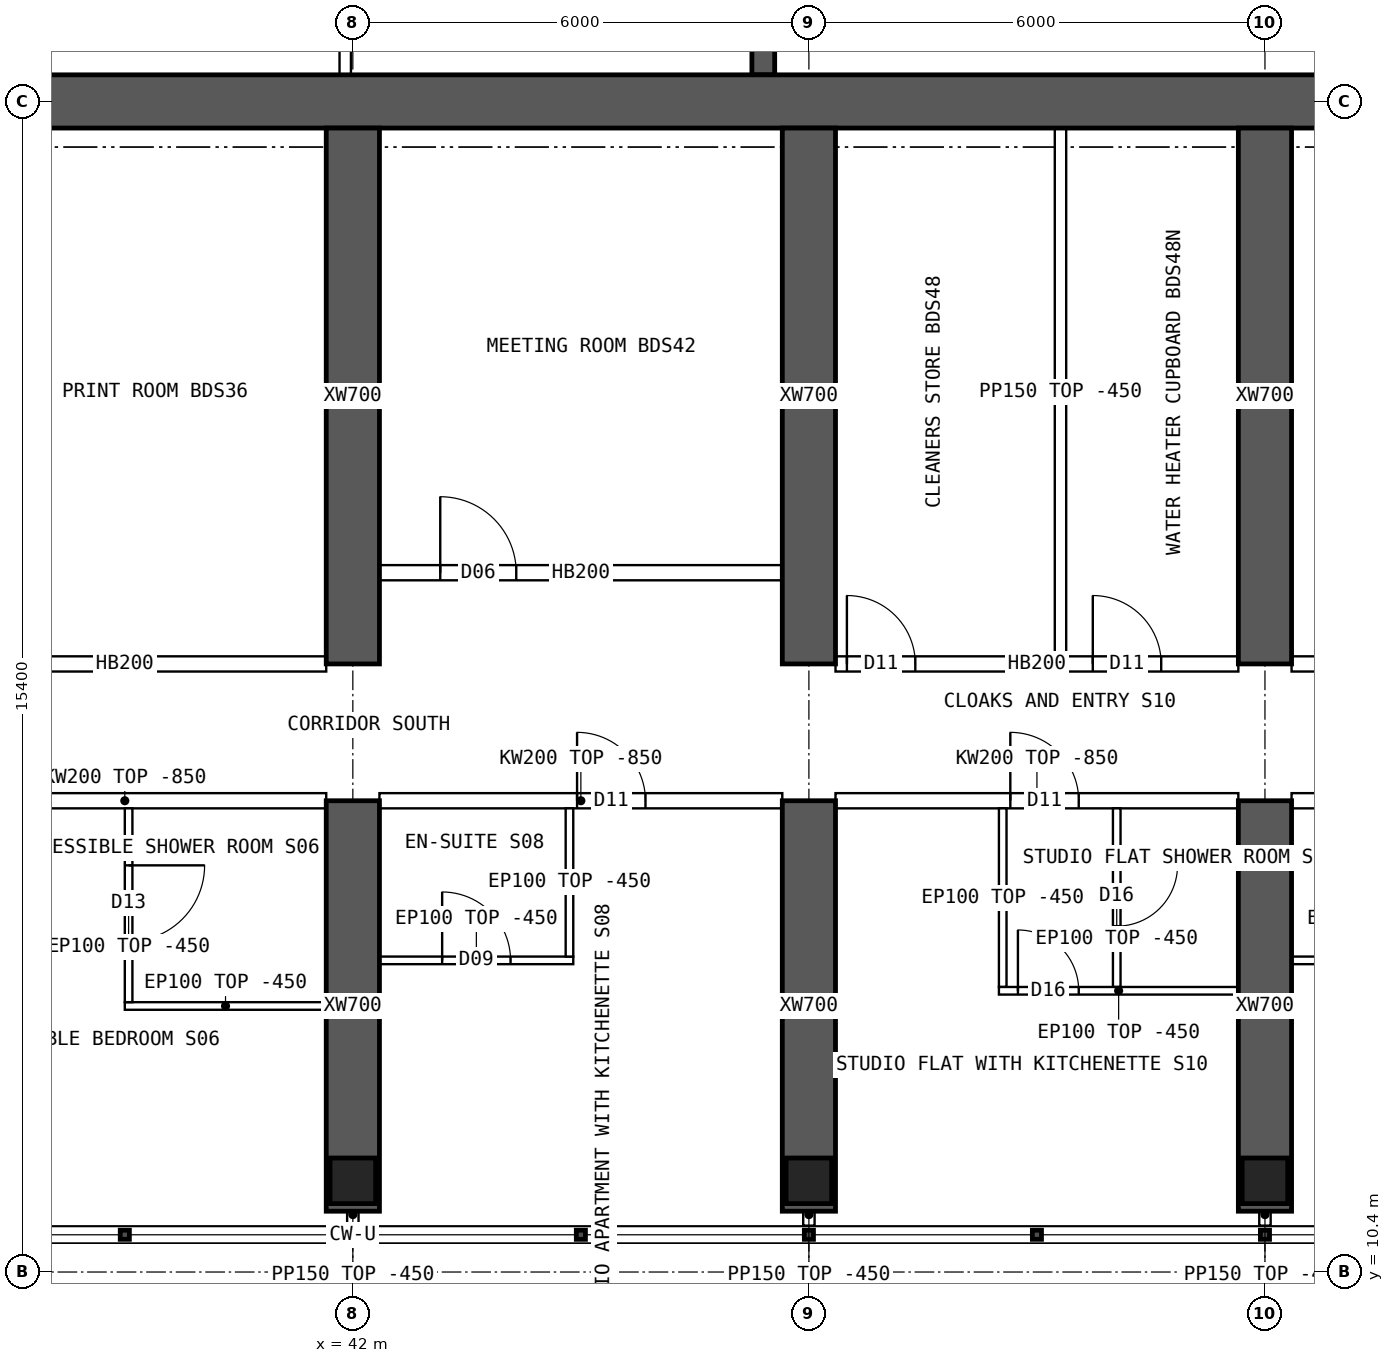
"""IFC4 building model, lengths in metres.
Left out: names, types, materials, properties, quantities, classifications, styles, units other than length and angle.
Written with IfcOpenShell. Run it as: python <this file> out.ifc"""

import sys

from ifc_helpers import new_model, si_unit, direction, frame, frame_2d, origin, origin_2d, place, context, subcontext, project, spatial, polyline, rectangle, hollow_rectangle, outline, extrude, element, fill, save


model = new_model("IFC4")
c1 = context("Model", 3, precision=1e-05, world=origin(), true_north=direction((0.0, 1.0)))
c2 = subcontext(c1, "Body", "Model", "MODEL_VIEW")
j1 = project(units=[si_unit("LENGTHUNIT", "METRE"), si_unit("PLANEANGLEUNIT", "RADIAN")], contexts=[c1])
p1 = place(None, origin())
s1 = spatial("IfcSite", under=j1, at=p1, CompositionType="ELEMENT")
p2 = place(p1, origin())
s2 = spatial("IfcBuilding", under=s1, at=p2, CompositionType="ELEMENT")
p3 = place(p2, frame((0.0, 0.0, 227.8)))
s3 = spatial("IfcBuildingStorey", under=s2, at=p3, CompositionType="ELEMENT", Elevation=227.8)
for number, where, z_axis, x_axis in (
    (1, (42.0, 11.6, 0.0), (0.0, 0.0, 1.0), (1.0, 0.0, 0.0)),
    (2, (48.0, 11.6, 0.0), (0.0, 0.0, 1.0), (1.0, 0.0, 0.0)),
    (3, (54.0, 11.6, 0.0), (0.0, 0.0, 1.0), (1.0, 0.0, 0.0)),
):
    element("IfcColumn", number, at=place(p3, frame(where, z_axis=z_axis, x_axis=x_axis)), inside=s3, PredefinedType="COLUMN", context=c2, shape_type="SweptSolid", body=[
        extrude(hollow_rectangle(XDim=0.6, YDim=0.6, WallThickness=0.06, at=origin_2d()), origin(), (0.0, 0.0, 1.0), 3.75),
    ])
p4 = place(p3, frame((18.0, 25.8, 0.0), z_axis=(0.0, 0.0, 1.0), x_axis=(1.0, 0.0, 0.0)))
e4 = element("IfcWall", 4, at=p4, inside=s3, PredefinedType="SHEAR", context=c2, shape_type="SweptSolid", body=[
    extrude(rectangle(XDim=48.0, YDim=0.7, at=frame_2d((24.0, 0.0))), origin(), (0.0, 0.0, 1.0), 3.75),
])
p5 = place(p3, frame((47.4, 26.15, 0.0), z_axis=(0.0, 0.0, 1.0), x_axis=(0.0, 1.0, 0.0)))
e5 = element("IfcWall", 5, at=p5, inside=s3, PredefinedType="SHEAR", context=c2, shape_type="SweptSolid", body=[
    extrude(rectangle(XDim=4.1, YDim=0.3, at=frame_2d((2.05, 0.0))), origin(), (0.0, 0.0, 1.0), 3.75),
])
p6 = place(p3, frame((42.0, 11.2, 0.0), z_axis=(0.0, 0.0, 1.0), x_axis=(0.0, 1.0, 0.0)))
e6 = element("IfcWall", 6, at=p6, inside=s3, PredefinedType="SHEAR", context=c2, shape_type="SweptSolid", body=[
    extrude(rectangle(XDim=5.4, YDim=0.7, at=frame_2d((2.7, 0.0))), origin(), (0.0, 0.0, 1.0), 3.75),
])
p7 = place(p3, frame((42.0, 18.4, 0.0), z_axis=(0.0, 0.0, 1.0), x_axis=(0.0, 1.0, 0.0)))
e7 = element("IfcWall", 7, at=p7, inside=s3, PredefinedType="SHEAR", context=c2, shape_type="SweptSolid", body=[
    extrude(rectangle(XDim=7.05, YDim=0.7, at=frame_2d((3.525, 0.0))), origin(), (0.0, 0.0, 1.0), 3.75),
])
p8 = place(p3, frame((48.0, 11.2, 0.0), z_axis=(0.0, 0.0, 1.0), x_axis=(0.0, 1.0, 0.0)))
e8 = element("IfcWall", 8, at=p8, inside=s3, PredefinedType="SHEAR", context=c2, shape_type="SweptSolid", body=[
    extrude(rectangle(XDim=5.4, YDim=0.7, at=frame_2d((2.7, 0.0))), origin(), (0.0, 0.0, 1.0), 3.75),
])
p9 = place(p3, frame((48.0, 18.4, 0.0), z_axis=(0.0, 0.0, 1.0), x_axis=(0.0, 1.0, 0.0)))
e9 = element("IfcWall", 9, at=p9, inside=s3, PredefinedType="SHEAR", context=c2, shape_type="SweptSolid", body=[
    extrude(rectangle(XDim=7.05, YDim=0.7, at=frame_2d((3.525, 0.0))), origin(), (0.0, 0.0, 1.0), 3.75),
])
p10 = place(p3, frame((54.0, 11.2, 0.0), z_axis=(0.0, 0.0, 1.0), x_axis=(0.0, 1.0, 0.0)))
e10 = element("IfcWall", 10, at=p10, inside=s3, PredefinedType="SHEAR", context=c2, shape_type="SweptSolid", body=[
    extrude(rectangle(XDim=5.4, YDim=0.7, at=frame_2d((2.7, 0.0))), origin(), (0.0, 0.0, 1.0), 3.75),
])
p11 = place(p3, frame((54.0, 18.4, 0.0), z_axis=(0.0, 0.0, 1.0), x_axis=(0.0, 1.0, 0.0)))
e11 = element("IfcWall", 11, at=p11, inside=s3, PredefinedType="SHEAR", context=c2, shape_type="SweptSolid", body=[
    extrude(rectangle(XDim=7.05, YDim=0.7, at=frame_2d((3.525, 0.0))), origin(), (0.0, 0.0, 1.0), 3.75),
])
p12 = place(p3, frame((41.9, 26.15, 0.0), z_axis=(0.0, 0.0, 1.0), x_axis=(0.0, 1.0, 0.0)))
e12 = element("IfcWall", 12, at=p12, inside=s3, PredefinedType="SOLIDWALL", context=c2, shape_type="SweptSolid", body=[
    extrude(rectangle(XDim=4.1, YDim=0.15, at=frame_2d((2.05, 0.0))), origin(), (0.0, 0.0, 1.0), 3.3),
])
p13 = place(p3, frame((36.35, 16.6, 0.0), z_axis=(0.0, 0.0, 1.0), x_axis=(1.0, 0.0, 0.0)))
e13 = element("IfcWall", 13, at=p13, inside=s3, PredefinedType="SOLIDWALL", context=c2, shape_type="SweptSolid", body=[
    extrude(outline(polyline([(0.0, 0.0), (5.3, 0.0), (5.3, 2.9), (0.0, 2.9), (0.0, 0.0)])), frame((0.0, 0.1, 0.0), z_axis=(0.0, -1.0, 0.0), x_axis=(1.0, 0.0, 0.0)), (0.0, 0.0, 1.0), 0.2),
])
p14 = place(p13, frame((0.3, 0.0, 0.0)))
e14 = element("IfcOpeningElement", 14, at=p14, cuts=e13, PredefinedType="OPENING", context=c2, shape_type="SweptSolid", body=[
    extrude(rectangle(XDim=1.0, YDim=2.1, at=frame_2d((0.5, 1.05))), frame((0.0, 0.11, 0.0), z_axis=(0.0, -1.0, 0.0), x_axis=(1.0, 0.0, 0.0)), (0.0, 0.0, 1.0), 0.22),
])
p15 = place(p3, frame((36.35, 18.4, 0.0), z_axis=(0.0, 0.0, 1.0), x_axis=(1.0, 0.0, 0.0)))
e15 = element("IfcWall", 15, at=p15, inside=s3, PredefinedType="SOLIDWALL", context=c2, shape_type="SweptSolid", body=[
    extrude(rectangle(XDim=5.3, YDim=0.2, at=frame_2d((2.65, 0.0))), origin(), (0.0, 0.0, 1.0), 3.3),
])
p16 = place(p15, frame((0.525, 0.0, 0.0)))
e16 = element("IfcOpeningElement", 16, at=p16, cuts=e15, PredefinedType="OPENING", context=c2, shape_type="SweptSolid", body=[
    extrude(rectangle(XDim=1.0, YDim=2.1, at=frame_2d((0.5, 1.05))), frame((0.0, 0.11, 0.0), z_axis=(0.0, -1.0, 0.0), x_axis=(1.0, 0.0, 0.0)), (0.0, 0.0, 1.0), 0.22),
])
p17 = place(p3, frame((42.35, 16.6, 0.0), z_axis=(0.0, 0.0, 1.0), x_axis=(1.0, 0.0, 0.0)))
e17 = element("IfcWall", 17, at=p17, inside=s3, PredefinedType="SOLIDWALL", context=c2, shape_type="SweptSolid", body=[
    extrude(outline(polyline([(0.0, 0.0), (5.3, 0.0), (5.3, 2.9), (0.0, 2.9), (0.0, 0.0)])), frame((0.0, 0.1, 0.0), z_axis=(0.0, -1.0, 0.0), x_axis=(1.0, 0.0, 0.0)), (0.0, 0.0, 1.0), 0.2),
])
p18 = place(p17, frame((2.6, 0.0, 0.0)))
e18 = element("IfcOpeningElement", 18, at=p18, cuts=e17, PredefinedType="OPENING", context=c2, shape_type="SweptSolid", body=[
    extrude(rectangle(XDim=0.9, YDim=2.1, at=frame_2d((0.45, 1.05))), frame((0.0, 0.11, 0.0), z_axis=(0.0, -1.0, 0.0), x_axis=(1.0, 0.0, 0.0)), (0.0, 0.0, 1.0), 0.22),
])
p19 = place(p3, frame((48.35, 16.6, 0.0), z_axis=(0.0, 0.0, 1.0), x_axis=(1.0, 0.0, 0.0)))
e19 = element("IfcWall", 19, at=p19, inside=s3, PredefinedType="SOLIDWALL", context=c2, shape_type="SweptSolid", body=[
    extrude(outline(polyline([(0.0, 0.0), (5.3, 0.0), (5.3, 2.9), (0.0, 2.9), (0.0, 0.0)])), frame((0.0, 0.1, 0.0), z_axis=(0.0, -1.0, 0.0), x_axis=(1.0, 0.0, 0.0)), (0.0, 0.0, 1.0), 0.2),
])
p20 = place(p19, frame((2.3, 0.0, 0.0)))
e20 = element("IfcOpeningElement", 20, at=p20, cuts=e19, PredefinedType="OPENING", context=c2, shape_type="SweptSolid", body=[
    extrude(rectangle(XDim=0.9, YDim=2.1, at=frame_2d((0.45, 1.05))), frame((0.0, 0.11, 0.0), z_axis=(0.0, -1.0, 0.0), x_axis=(1.0, 0.0, 0.0)), (0.0, 0.0, 1.0), 0.22),
])
p21 = place(p3, frame((48.35, 18.4, 0.0), z_axis=(0.0, 0.0, 1.0), x_axis=(1.0, 0.0, 0.0)))
e21 = element("IfcWall", 21, at=p21, inside=s3, PredefinedType="SOLIDWALL", context=c2, shape_type="SweptSolid", body=[
    extrude(rectangle(XDim=5.3, YDim=0.2, at=frame_2d((2.65, 0.0))), origin(), (0.0, 0.0, 1.0), 3.3),
])
p22 = place(p21, frame((0.15, 0.0, 0.0)))
e22 = element("IfcOpeningElement", 22, at=p22, cuts=e21, PredefinedType="OPENING", context=c2, shape_type="SweptSolid", body=[
    extrude(rectangle(XDim=0.9, YDim=2.1, at=frame_2d((0.45, 1.05))), frame((0.0, 0.11, 0.0), z_axis=(0.0, -1.0, 0.0), x_axis=(1.0, 0.0, 0.0)), (0.0, 0.0, 1.0), 0.22),
])
p23 = place(p21, frame((3.385, 0.0, 0.0)))
e23 = element("IfcOpeningElement", 23, at=p23, cuts=e21, PredefinedType="OPENING", context=c2, shape_type="SweptSolid", body=[
    extrude(rectangle(XDim=0.9, YDim=2.1, at=frame_2d((0.45, 1.05))), frame((0.0, 0.11, 0.0), z_axis=(0.0, -1.0, 0.0), x_axis=(1.0, 0.0, 0.0)), (0.0, 0.0, 1.0), 0.22),
])
p24 = place(p3, frame((54.35, 16.6, 0.0), z_axis=(0.0, 0.0, 1.0), x_axis=(1.0, 0.0, 0.0)))
e24 = element("IfcWall", 24, at=p24, inside=s3, PredefinedType="SOLIDWALL", context=c2, shape_type="SweptSolid", body=[
    extrude(outline(polyline([(0.0, 0.0), (5.3, 0.0), (5.3, 2.9), (0.0, 2.9), (0.0, 0.0)])), frame((0.0, 0.1, 0.0), z_axis=(0.0, -1.0, 0.0), x_axis=(1.0, 0.0, 0.0)), (0.0, 0.0, 1.0), 0.2),
])
p25 = place(p24, frame((2.6, 0.0, 0.0)))
e25 = element("IfcOpeningElement", 25, at=p25, cuts=e24, PredefinedType="OPENING", context=c2, shape_type="SweptSolid", body=[
    extrude(rectangle(XDim=0.9, YDim=2.1, at=frame_2d((0.45, 1.05))), frame((0.0, 0.11, 0.0), z_axis=(0.0, -1.0, 0.0), x_axis=(1.0, 0.0, 0.0)), (0.0, 0.0, 1.0), 0.22),
])
p26 = place(p3, frame((54.35, 18.4, 0.0), z_axis=(0.0, 0.0, 1.0), x_axis=(1.0, 0.0, 0.0)))
e26 = element("IfcWall", 26, at=p26, inside=s3, PredefinedType="SOLIDWALL", context=c2, shape_type="SweptSolid", body=[
    extrude(rectangle(XDim=5.3, YDim=0.2, at=frame_2d((2.65, 0.0))), origin(), (0.0, 0.0, 1.0), 3.3),
])
p27 = place(p26, frame((0.8, 0.0, 0.0)))
e27 = element("IfcOpeningElement", 27, at=p27, cuts=e26, PredefinedType="OPENING", context=c2, shape_type="SweptSolid", body=[
    extrude(rectangle(XDim=1.0, YDim=2.1, at=frame_2d((0.5, 1.05))), frame((0.0, 0.11, 0.0), z_axis=(0.0, -1.0, 0.0), x_axis=(1.0, 0.0, 0.0)), (0.0, 0.0, 1.0), 0.22),
])
p28 = place(p3, frame((39.0, 13.9, 0.0), z_axis=(0.0, 0.0, 1.0), x_axis=(1.0, 0.0, 0.0)))
e28 = element("IfcWall", 28, at=p28, inside=s3, PredefinedType="PARTITIONING", context=c2, shape_type="SweptSolid", body=[
    extrude(rectangle(XDim=2.65, YDim=0.1, at=frame_2d((1.325, 0.0))), origin(), (0.0, 0.0, 1.0), 3.3),
])
p29 = place(p3, frame((39.05, 13.95, 0.0), z_axis=(0.0, 0.0, 1.0), x_axis=(0.0, 1.0, 0.0)))
e29 = element("IfcWall", 29, at=p29, inside=s3, PredefinedType="PARTITIONING", context=c2, shape_type="SweptSolid", body=[
    extrude(outline(polyline([(0.0, 0.0), (2.55, 0.0), (2.55, 2.9), (2.502, 2.9), (2.5, 3.3), (0.0, 3.3), (0.0, 0.0)])), frame((0.0, 0.05, 0.0), z_axis=(0.0, -1.0, 0.0), x_axis=(1.0, 0.0, 0.0)), (0.0, 0.0, 1.0), 0.1),
])
p30 = place(p29, frame((0.8, 0.0, 0.0)))
e30 = element("IfcOpeningElement", 30, at=p30, cuts=e29, PredefinedType="OPENING", context=c2, shape_type="SweptSolid", body=[
    extrude(rectangle(XDim=1.0, YDim=2.1, at=frame_2d((0.5, 1.05))), frame((0.0, 0.06, 0.0), z_axis=(0.0, -1.0, 0.0), x_axis=(1.0, 0.0, 0.0)), (0.0, 0.0, 1.0), 0.12),
])
p31 = place(p3, frame((44.9, 14.5, 0.0), z_axis=(0.0, 0.0, 1.0), x_axis=(-1.0, 0.0, 0.0)))
e31 = element("IfcWall", 31, at=p31, inside=s3, PredefinedType="PARTITIONING", context=c2, shape_type="SweptSolid", body=[
    extrude(rectangle(XDim=2.55, YDim=0.1, at=frame_2d((1.275, 0.0))), origin(), (0.0, 0.0, 1.0), 3.3),
])
p32 = place(p31, frame((0.825, 0.0, 0.0)))
e32 = element("IfcOpeningElement", 32, at=p32, cuts=e31, PredefinedType="OPENING", context=c2, shape_type="SweptSolid", body=[
    extrude(rectangle(XDim=0.9, YDim=2.1, at=frame_2d((0.45, 1.05))), frame((0.0, 0.06, 0.0), z_axis=(0.0, -1.0, 0.0), x_axis=(1.0, 0.0, 0.0)), (0.0, 0.0, 1.0), 0.12),
])
p33 = place(p3, frame((44.85, 14.55, 0.0), z_axis=(0.0, 0.0, 1.0), x_axis=(0.0, 1.0, 0.0)))
e33 = element("IfcWall", 33, at=p33, inside=s3, PredefinedType="PARTITIONING", context=c2, shape_type="SweptSolid", body=[
    extrude(outline(polyline([(0.0, 0.0), (1.95, 0.0), (1.95, 2.9), (1.902, 2.9), (1.9, 3.3), (0.0, 3.3), (0.0, 0.0)])), frame((0.0, 0.05, 0.0), z_axis=(0.0, -1.0, 0.0), x_axis=(1.0, 0.0, 0.0)), (0.0, 0.0, 1.0), 0.1),
])
p34 = place(p3, frame((53.65, 14.1, 0.0), z_axis=(0.0, 0.0, 1.0), x_axis=(-1.0, 0.0, 0.0)))
e34 = element("IfcWall", 34, at=p34, inside=s3, PredefinedType="PARTITIONING", context=c2, shape_type="SweptSolid", body=[
    extrude(rectangle(XDim=3.15, YDim=0.1, at=frame_2d((1.575, 0.0))), origin(), (0.0, 0.0, 1.0), 3.3),
])
p35 = place(p34, frame((2.1, 0.0, 0.0)))
e35 = element("IfcOpeningElement", 35, at=p35, cuts=e34, PredefinedType="OPENING", context=c2, shape_type="SweptSolid", body=[
    extrude(rectangle(XDim=0.8, YDim=2.1, at=frame_2d((0.4, 1.05))), frame((0.0, 0.06, 0.0), z_axis=(0.0, -1.0, 0.0), x_axis=(1.0, 0.0, 0.0)), (0.0, 0.0, 1.0), 0.12),
])
p36 = place(p3, frame((50.55, 14.15, 0.0), z_axis=(0.0, 0.0, 1.0), x_axis=(0.0, 1.0, 0.0)))
e36 = element("IfcWall", 36, at=p36, inside=s3, PredefinedType="PARTITIONING", context=c2, shape_type="SweptSolid", body=[
    extrude(outline(polyline([(0.0, 0.0), (2.35, 0.0), (2.35, 2.9), (2.302, 2.9), (2.3, 3.3), (0.0, 3.3), (0.0, 0.0)])), frame((0.0, 0.05, 0.0), z_axis=(0.0, -1.0, 0.0), x_axis=(1.0, 0.0, 0.0)), (0.0, 0.0, 1.0), 0.1),
])
p37 = place(p3, frame((52.05, 14.15, 0.0), z_axis=(0.0, 0.0, 1.0), x_axis=(0.0, 1.0, 0.0)))
e37 = element("IfcWall", 37, at=p37, inside=s3, PredefinedType="PARTITIONING", context=c2, shape_type="SweptSolid", body=[
    extrude(outline(polyline([(0.0, 0.0), (2.35, 0.0), (2.35, 2.9), (2.302, 2.9), (2.3, 3.3), (0.0, 3.3), (0.0, 0.0)])), frame((0.0, 0.05, 0.0), z_axis=(0.0, -1.0, 0.0), x_axis=(1.0, 0.0, 0.0)), (0.0, 0.0, 1.0), 0.1),
])
p38 = place(p37, frame((0.8, 0.0, 0.0)))
e38 = element("IfcOpeningElement", 38, at=p38, cuts=e37, PredefinedType="OPENING", context=c2, shape_type="SweptSolid", body=[
    extrude(rectangle(XDim=0.8, YDim=2.1, at=frame_2d((0.4, 1.05))), frame((0.0, 0.06, 0.0), z_axis=(0.0, -1.0, 0.0), x_axis=(1.0, 0.0, 0.0)), (0.0, 0.0, 1.0), 0.12),
])
p39 = place(p3, frame((56.9, 14.5, 0.0), z_axis=(0.0, 0.0, 1.0), x_axis=(-1.0, 0.0, 0.0)))
e39 = element("IfcWall", 39, at=p39, inside=s3, PredefinedType="PARTITIONING", context=c2, shape_type="SweptSolid", body=[
    extrude(rectangle(XDim=2.55, YDim=0.1, at=frame_2d((1.275, 0.0))), origin(), (0.0, 0.0, 1.0), 3.3),
])
p40 = place(p39, frame((0.825, 0.0, 0.0)))
e40 = element("IfcOpeningElement", 40, at=p40, cuts=e39, PredefinedType="OPENING", context=c2, shape_type="SweptSolid", body=[
    extrude(rectangle(XDim=0.9, YDim=2.1, at=frame_2d((0.45, 1.05))), frame((0.0, 0.06, 0.0), z_axis=(0.0, -1.0, 0.0), x_axis=(1.0, 0.0, 0.0)), (0.0, 0.0, 1.0), 0.12),
])
p41 = place(p3, frame((42.35, 19.6, 0.0), z_axis=(0.0, 0.0, 1.0), x_axis=(1.0, 0.0, 0.0)))
e41 = element("IfcWall", 41, at=p41, inside=s3, PredefinedType="SOLIDWALL", context=c2, shape_type="SweptSolid", body=[
    extrude(rectangle(XDim=5.3, YDim=0.2, at=frame_2d((2.65, 0.0))), origin(), (0.0, 0.0, 1.0), 3.3),
])
p42 = place(p41, frame((0.8, 0.0, 0.0)))
e42 = element("IfcOpeningElement", 42, at=p42, cuts=e41, PredefinedType="OPENING", context=c2, shape_type="SweptSolid", body=[
    extrude(rectangle(XDim=1.0, YDim=2.1, at=frame_2d((0.5, 1.05))), frame((0.0, 0.11, 0.0), z_axis=(0.0, -1.0, 0.0), x_axis=(1.0, 0.0, 0.0)), (0.0, 0.0, 1.0), 0.22),
])
p43 = place(p3, frame((51.31, 18.5, 0.0), z_axis=(0.0, 0.0, 1.0), x_axis=(0.0, 1.0, 0.0)))
e43 = element("IfcWall", 43, at=p43, inside=s3, PredefinedType="PARTITIONING", context=c2, shape_type="SweptSolid", body=[
    extrude(rectangle(XDim=6.95, YDim=0.15, at=frame_2d((3.475, 0.0))), origin(), (0.0, 0.0, 1.0), 3.3),
])
for number, where, z_axis, x_axis in (
    (44, (42.0, 11.3, 0.0), (0.0, 0.0, 1.0), (0.0, -1.0, 0.0)),
    (45, (48.0, 11.3, 0.0), (0.0, 0.0, 1.0), (0.0, -1.0, 0.0)),
    (46, (54.0, 11.3, 0.0), (0.0, 0.0, 1.0), (0.0, -1.0, 0.0)),
):
    element("IfcWall", number, at=place(p3, frame(where, z_axis=z_axis, x_axis=x_axis)), inside=s3, PredefinedType="PARTITIONING", context=c2, shape_type="SweptSolid", body=[
        extrude(rectangle(XDim=0.29, YDim=0.15, at=frame_2d((0.145, 0.0))), origin(), (0.0, 0.0, 1.0), 3.3),
    ])
p44 = place(p30, origin())
e47 = element("IfcDoor", 47, at=p44, inside=s3, OperationType="SINGLE_SWING_RIGHT", PredefinedType="DOOR", context=c2, shape_type="SweptSolid", body=[
    extrude(rectangle(XDim=1.0, YDim=2.1, at=frame_2d((0.5, 1.05))), frame((0.0, 0.025, 0.0), z_axis=(0.0, -1.0, 0.0), x_axis=(1.0, 0.0, 0.0)), (0.0, 0.0, 1.0), 0.05),
])
fill(e30, e47)
p45 = place(p32, origin())
e48 = element("IfcDoor", 48, at=p45, inside=s3, OperationType="SINGLE_SWING_RIGHT", PredefinedType="DOOR", context=c2, shape_type="SweptSolid", body=[
    extrude(rectangle(XDim=0.9, YDim=2.1, at=frame_2d((0.45, 1.05))), frame((0.0, 0.025, 0.0), z_axis=(0.0, -1.0, 0.0), x_axis=(1.0, 0.0, 0.0)), (0.0, 0.0, 1.0), 0.05),
])
fill(e32, e48)
p46 = place(p18, origin())
e49 = element("IfcDoor", 49, at=p46, inside=s3, OperationType="SINGLE_SWING_LEFT", PredefinedType="DOOR", context=c2, shape_type="SweptSolid", body=[
    extrude(rectangle(XDim=0.9, YDim=2.1, at=frame_2d((0.45, 1.05))), frame((0.0, 0.025, 0.0), z_axis=(0.0, -1.0, 0.0), x_axis=(1.0, 0.0, 0.0)), (0.0, 0.0, 1.0), 0.05),
])
fill(e18, e49)
p47 = place(p35, origin())
e50 = element("IfcDoor", 50, at=p47, inside=s3, OperationType="SINGLE_SWING_RIGHT", PredefinedType="DOOR", context=c2, shape_type="SweptSolid", body=[
    extrude(rectangle(XDim=0.8, YDim=2.1, at=frame_2d((0.4, 1.05))), frame((0.0, 0.025, 0.0), z_axis=(0.0, -1.0, 0.0), x_axis=(1.0, 0.0, 0.0)), (0.0, 0.0, 1.0), 0.05),
])
fill(e35, e50)
p48 = place(p38, origin())
e51 = element("IfcDoor", 51, at=p48, inside=s3, OperationType="SINGLE_SWING_RIGHT", PredefinedType="DOOR", context=c2, shape_type="SweptSolid", body=[
    extrude(rectangle(XDim=0.8, YDim=2.1, at=frame_2d((0.4, 1.05))), frame((0.0, 0.025, 0.0), z_axis=(0.0, -1.0, 0.0), x_axis=(1.0, 0.0, 0.0)), (0.0, 0.0, 1.0), 0.05),
])
fill(e38, e51)
p49 = place(p20, origin())
e52 = element("IfcDoor", 52, at=p49, inside=s3, OperationType="SINGLE_SWING_LEFT", PredefinedType="DOOR", context=c2, shape_type="SweptSolid", body=[
    extrude(rectangle(XDim=0.9, YDim=2.1, at=frame_2d((0.45, 1.05))), frame((0.0, 0.025, 0.0), z_axis=(0.0, -1.0, 0.0), x_axis=(1.0, 0.0, 0.0)), (0.0, 0.0, 1.0), 0.05),
])
fill(e20, e52)
p50 = place(p42, origin())
e53 = element("IfcDoor", 53, at=p50, inside=s3, OperationType="SINGLE_SWING_LEFT", PredefinedType="DOOR", context=c2, shape_type="SweptSolid", body=[
    extrude(rectangle(XDim=1.0, YDim=2.1, at=frame_2d((0.5, 1.05))), frame((0.0, 0.025, 0.0), z_axis=(0.0, -1.0, 0.0), x_axis=(1.0, 0.0, 0.0)), (0.0, 0.0, 1.0), 0.05),
])
fill(e42, e53)
p51 = place(p22, origin())
e54 = element("IfcDoor", 54, at=p51, inside=s3, OperationType="SINGLE_SWING_LEFT", PredefinedType="DOOR", context=c2, shape_type="SweptSolid", body=[
    extrude(rectangle(XDim=0.9, YDim=2.1, at=frame_2d((0.45, 1.05))), frame((0.0, 0.025, 0.0), z_axis=(0.0, -1.0, 0.0), x_axis=(1.0, 0.0, 0.0)), (0.0, 0.0, 1.0), 0.05),
])
fill(e22, e54)
p52 = place(p23, origin())
e55 = element("IfcDoor", 55, at=p52, inside=s3, OperationType="SINGLE_SWING_LEFT", PredefinedType="DOOR", context=c2, shape_type="SweptSolid", body=[
    extrude(rectangle(XDim=0.9, YDim=2.1, at=frame_2d((0.45, 1.05))), frame((0.0, 0.025, 0.0), z_axis=(0.0, -1.0, 0.0), x_axis=(1.0, 0.0, 0.0)), (0.0, 0.0, 1.0), 0.05),
])
fill(e23, e55)
save(model, sys.argv[1])
